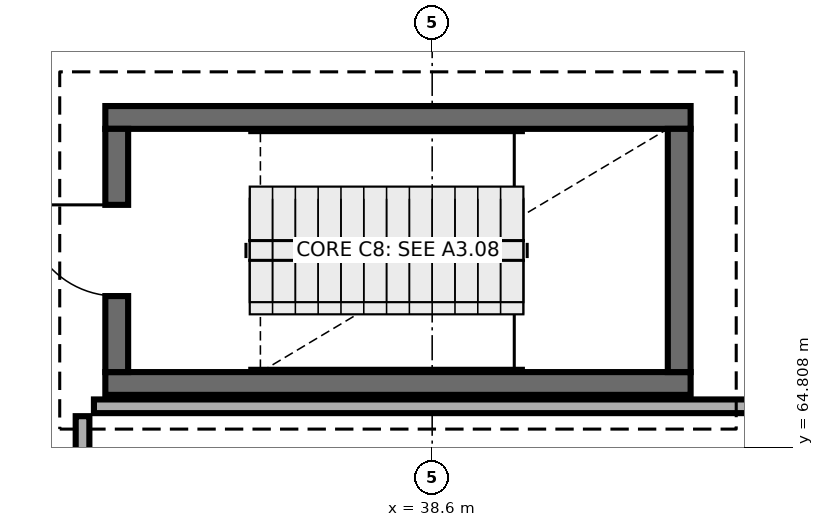
"""IFC4 building model, lengths in metres.
Left out: names, types, materials, properties, quantities, classifications, styles, units other than length and angle.
Written with IfcOpenShell. Run it as: python <this file> out.ifc"""

import sys

from ifc_helpers import new_model, si_unit, direction, frame, frame_2d, origin, place, context, subcontext, project, spatial, rectangle, extrude, element, fill, save


model = new_model("IFC4")
c1 = context("Model", 3, precision=1e-05, world=origin(), true_north=direction((0.0, 1.0)))
c2 = subcontext(c1, "Body", "Model", "MODEL_VIEW")
j1 = project(units=[si_unit("LENGTHUNIT", "METRE"), si_unit("PLANEANGLEUNIT", "RADIAN")], contexts=[c1])
p1 = place(None, origin())
s1 = spatial("IfcSite", under=j1, at=p1, CompositionType="ELEMENT")
p2 = place(p1, origin())
s2 = spatial("IfcBuilding", under=s1, at=p2, CompositionType="ELEMENT")
p3 = place(p2, origin())
s3 = spatial("IfcBuildingStorey", under=s2, at=p3, CompositionType="ELEMENT", Elevation=0.0)
for number, where, z_axis, x_axis in (
    (1, (34.3, 65.65, 0.0), (0.0, 0.0, 1.0), (1.0, 0.0, 0.0)),
    (2, (42.0, 69.15, 0.0), (0.0, 0.0, 1.0), (-1.0, 0.0, 0.0)),
):
    element("IfcWall", number, at=place(p3, frame(where, z_axis=z_axis, x_axis=x_axis)), inside=s3, PredefinedType="SHEAR", context=c2, shape_type="SweptSolid", body=[
        extrude(rectangle(XDim=7.7, YDim=0.3, at=frame_2d((3.85, 0.0))), origin(), (0.0, 0.0, 1.0), 4.8),
    ])
p4 = place(p3, frame((34.45, 69.0, 0.0), z_axis=(0.0, 0.0, 1.0), x_axis=(0.0, -1.0, 0.0)))
e3 = element("IfcWall", 3, at=p4, inside=s3, PredefinedType="SHEAR", context=c2, shape_type="SweptSolid", body=[
    extrude(rectangle(XDim=3.2, YDim=0.3, at=frame_2d((1.6, 0.0))), origin(), (0.0, 0.0, 1.0), 4.8),
])
p5 = place(p4, frame((1.0, 0.0, 0.0)))
e4 = element("IfcOpeningElement", 4, at=p5, cuts=e3, PredefinedType="OPENING", context=c2, shape_type="SweptSolid", body=[
    extrude(rectangle(XDim=1.2, YDim=2.15, at=frame_2d((0.6, 1.075))), frame((0.0, 0.16, 0.0), z_axis=(0.0, -1.0, 0.0), x_axis=(1.0, 0.0, 0.0)), (0.0, 0.0, 1.0), 0.32),
])
p6 = place(p3, frame((41.85, 65.8, 0.0), z_axis=(0.0, 0.0, 1.0), x_axis=(0.0, 1.0, 0.0)))
e5 = element("IfcWall", 5, at=p6, inside=s3, PredefinedType="SHEAR", context=c2, shape_type="SweptSolid", body=[
    extrude(rectangle(XDim=3.2, YDim=0.3, at=frame_2d((1.6, 0.0))), origin(), (0.0, 0.0, 1.0), 4.8),
])
p7 = place(p3, frame((34.15, 65.35, 0.0), z_axis=(0.0, 0.0, 1.0), x_axis=(1.0, 0.0, 0.0)))
e6 = element("IfcWall", 6, at=p7, inside=s3, PredefinedType="PARTITIONING", context=c2, shape_type="SweptSolid", body=[
    extrude(rectangle(XDim=12.965, YDim=0.18, at=frame_2d((6.482, 0.0))), origin(), (0.0, 0.0, 1.0), 4.55),
])
p8 = place(p3, frame((34.0, 61.75, 0.0), z_axis=(0.0, 0.0, 1.0), x_axis=(0.0, 1.0, 0.0)))
e7 = element("IfcWall", 7, at=p8, inside=s3, PredefinedType="PARTITIONING", context=c2, shape_type="SweptSolid", body=[
    extrude(rectangle(XDim=3.47, YDim=0.18, at=frame_2d((1.735, 0.0))), origin(), (0.0, 0.0, 1.0), 4.55),
])
p9 = place(p8, frame((1.285, 0.0, 0.0)))
e8 = element("IfcOpeningElement", 8, at=p9, cuts=e7, PredefinedType="OPENING", context=c2, shape_type="SweptSolid", body=[
    extrude(rectangle(XDim=0.9, YDim=2.1, at=frame_2d((0.45, 1.05))), frame((0.0, 0.1, 0.0), z_axis=(0.0, -1.0, 0.0), x_axis=(1.0, 0.0, 0.0)), (0.0, 0.0, 1.0), 0.2),
])
p10 = place(p5, frame((1.2, 0.0, 0.0), z_axis=(0.0, 0.0, 1.0), x_axis=(-1.0, 0.0, 0.0)))
e9 = element("IfcDoor", 9, at=p10, inside=s3, OperationType="SINGLE_SWING_LEFT", PredefinedType="DOOR", context=c2, shape_type="SweptSolid", body=[
    extrude(rectangle(XDim=1.2, YDim=2.15, at=frame_2d((0.6, 1.075))), frame((0.0, 0.025, 0.0), z_axis=(0.0, -1.0, 0.0), x_axis=(1.0, 0.0, 0.0)), (0.0, 0.0, 1.0), 0.05),
])
fill(e4, e9)
save(model, sys.argv[1])
